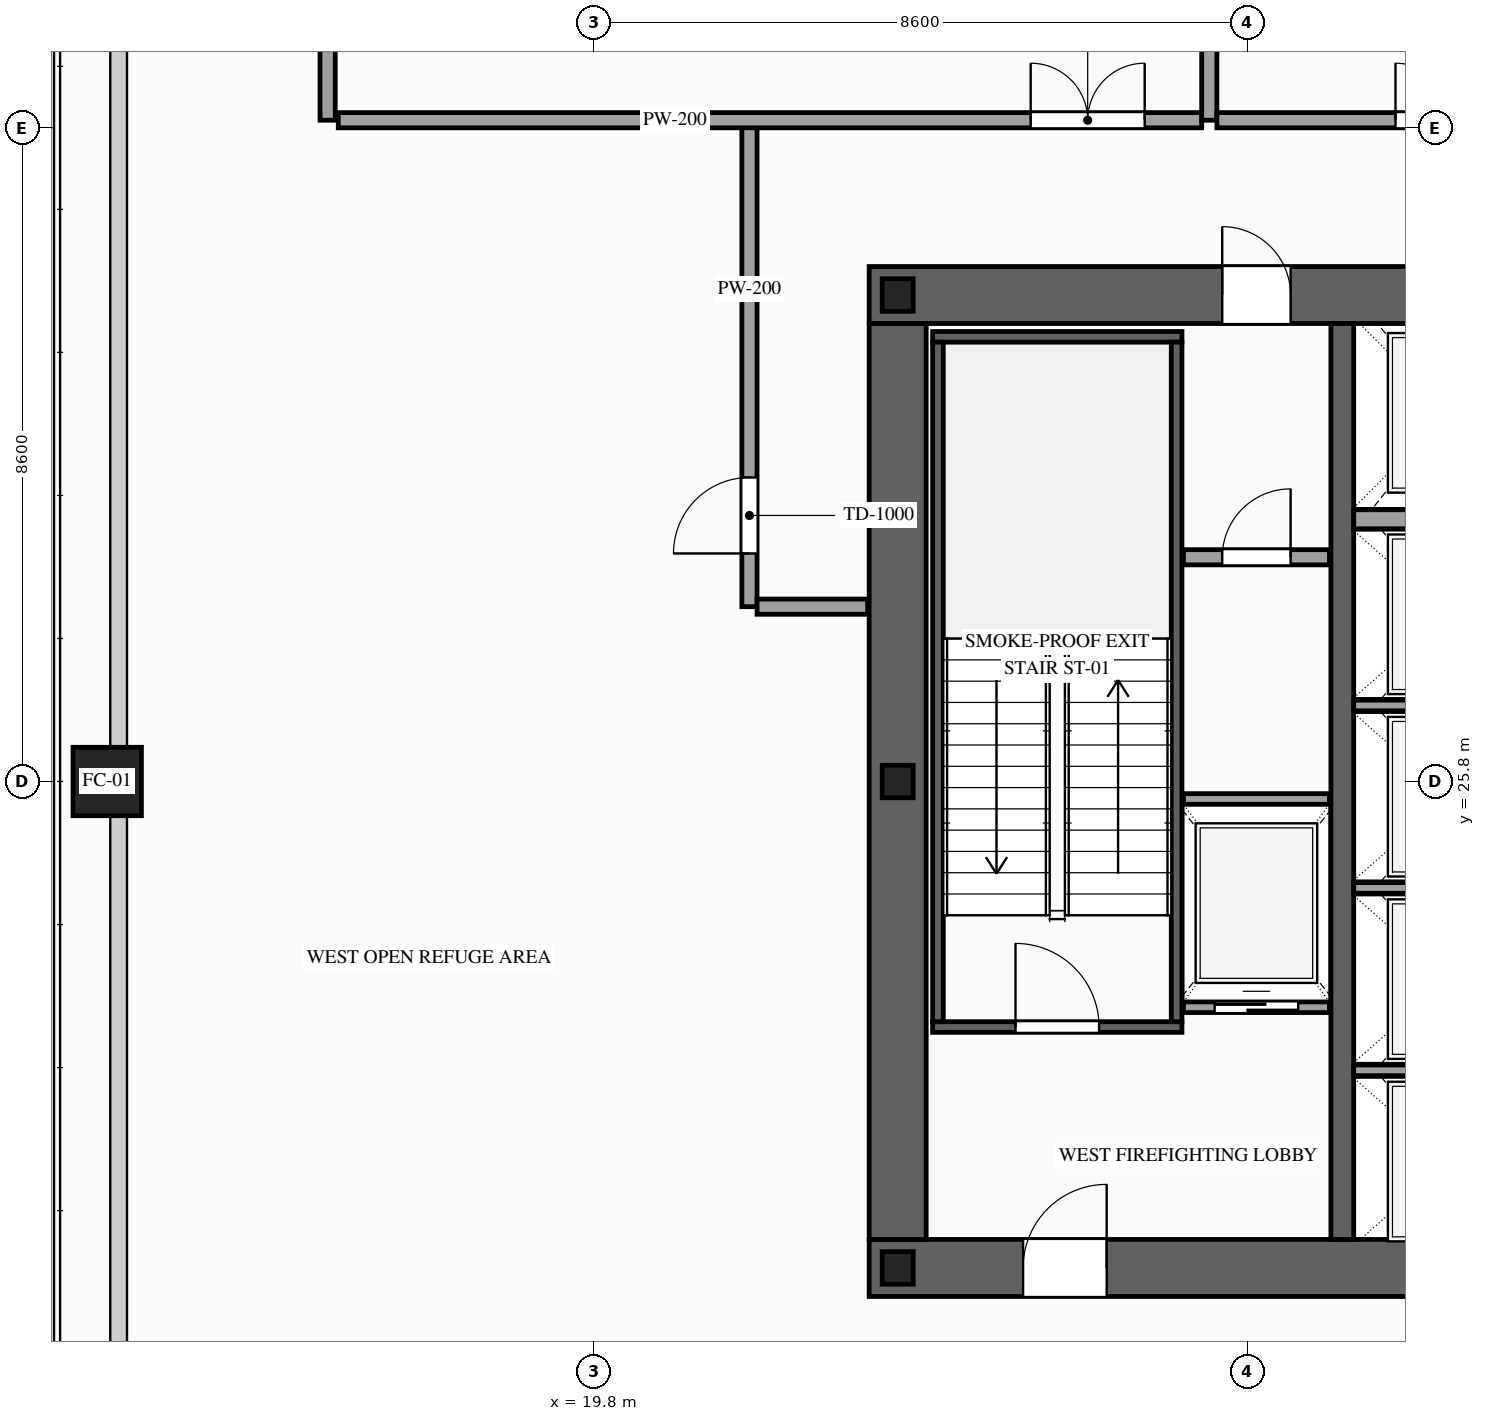
"""IFC4 building model, lengths in metres.
Left out: names, types, materials, properties, quantities, classifications, styles, units other than length and angle.
Written with IfcOpenShell. Run it as: python <this file> out.ifc"""

import sys

from ifc_helpers import new_model, si_unit, direction, frame, frame_2d, origin, origin_2d, place, context, subcontext, project, spatial, rectangle, hollow_rectangle, i_section, extrude, source, transform, mapped, element, fill, save


model = new_model("IFC4")
c1 = context("Model", 3, precision=1e-05, world=origin(), true_north=direction((0.0, 1.0)))
c2 = subcontext(c1, "Body", "Model", "MODEL_VIEW")
j1 = project(units=[si_unit("LENGTHUNIT", "METRE"), si_unit("PLANEANGLEUNIT", "RADIAN")], contexts=[c1])
p1 = place(None, origin())
s1 = spatial("IfcSite", under=j1, at=p1, CompositionType="ELEMENT")
p2 = place(p1, origin())
s2 = spatial("IfcBuilding", under=s1, at=p2, CompositionType="ELEMENT")
p3 = place(p2, frame((0.0, 0.0, 129.8)))
s3 = spatial("IfcBuildingStorey", under=s2, at=p3, CompositionType="ELEMENT", Elevation=129.8)
p4 = place(p3, frame((23.425, 19.4, 0.0), z_axis=(0.0, 0.0, 1.0), x_axis=(1.0, 0.0, 0.0)))
e1 = element("IfcWall", 1, at=p4, inside=s3, PredefinedType="SHEAR", context=c2, shape_type="SweptSolid", body=[
    extrude(rectangle(XDim=27.15, YDim=0.75, at=frame_2d((13.575, 0.0))), origin(), (0.0, 0.0, 1.0), 4.6),
])
p5 = place(p4, frame((2.025, 0.0, 0.0)))
e2 = element("IfcOpeningElement", 2, at=p5, cuts=e1, PredefinedType="OPENING", context=c2, shape_type="SweptSolid", body=[
    extrude(rectangle(XDim=1.1, YDim=2.2, at=frame_2d((0.55, 1.1))), frame((0.0, 0.39, 0.0), z_axis=(0.0, -1.0, 0.0), x_axis=(1.0, 0.0, 0.0)), (0.0, 0.0, 1.0), 0.78),
])
p6 = place(p4, frame((9.925, 0.0, 0.0)))
e3 = element("IfcOpeningElement", 3, at=p6, cuts=e1, PredefinedType="OPENING", context=c2, shape_type="SweptSolid", body=[
    extrude(rectangle(XDim=1.1, YDim=2.2, at=frame_2d((0.55, 1.1))), frame((0.0, 0.39, 0.0), z_axis=(0.0, -1.0, 0.0), x_axis=(1.0, 0.0, 0.0)), (0.0, 0.0, 1.0), 0.78),
])
p7 = place(p4, frame((23.125, 0.0, 0.0)))
e4 = element("IfcOpeningElement", 4, at=p7, cuts=e1, PredefinedType="OPENING", context=c2, shape_type="SweptSolid", body=[
    extrude(rectangle(XDim=1.1, YDim=2.2, at=frame_2d((0.55, 1.1))), frame((0.0, 0.39, 0.0), z_axis=(0.0, -1.0, 0.0), x_axis=(1.0, 0.0, 0.0)), (0.0, 0.0, 1.0), 0.78),
])
p8 = place(p4, frame((19.745, 0.0, 0.0)))
e5 = element("IfcOpeningElement", 5, at=p8, cuts=e1, PredefinedType="OPENING", context=c2, shape_type="SweptSolid", body=[
    extrude(rectangle(XDim=0.9, YDim=2.15, at=frame_2d((0.45, 1.075))), frame((0.0, 0.39, 0.0), z_axis=(0.0, -1.0, 0.0), x_axis=(1.0, 0.0, 0.0)), (0.0, 0.0, 1.0), 0.78),
])
p9 = place(p3, frame((23.425, 32.2, 0.0), z_axis=(0.0, 0.0, 1.0), x_axis=(1.0, 0.0, 0.0)))
e6 = element("IfcWall", 6, at=p9, inside=s3, PredefinedType="SHEAR", context=c2, shape_type="SweptSolid", body=[
    extrude(rectangle(XDim=27.15, YDim=0.75, at=frame_2d((13.575, 0.0))), origin(), (0.0, 0.0, 1.0), 4.6),
])
p10 = place(p9, frame((4.645, 0.0, 0.0)))
e7 = element("IfcOpeningElement", 7, at=p10, cuts=e6, PredefinedType="OPENING", context=c2, shape_type="SweptSolid", body=[
    extrude(rectangle(XDim=0.9, YDim=2.15, at=frame_2d((0.45, 1.075))), frame((0.0, 0.39, 0.0), z_axis=(0.0, -1.0, 0.0), x_axis=(1.0, 0.0, 0.0)), (0.0, 0.0, 1.0), 0.78),
])
p11 = place(p9, frame((9.925, 0.0, 0.0)))
e8 = element("IfcOpeningElement", 8, at=p11, cuts=e6, PredefinedType="OPENING", context=c2, shape_type="SweptSolid", body=[
    extrude(rectangle(XDim=1.1, YDim=2.2, at=frame_2d((0.55, 1.1))), frame((0.0, 0.39, 0.0), z_axis=(0.0, -1.0, 0.0), x_axis=(1.0, 0.0, 0.0)), (0.0, 0.0, 1.0), 0.78),
])
p12 = place(p9, frame((15.775, 0.0, 0.0)))
e9 = element("IfcOpeningElement", 9, at=p12, cuts=e6, PredefinedType="OPENING", context=c2, shape_type="SweptSolid", body=[
    extrude(rectangle(XDim=1.1, YDim=2.2, at=frame_2d((0.55, 1.1))), frame((0.0, 0.39, 0.0), z_axis=(0.0, -1.0, 0.0), x_axis=(1.0, 0.0, 0.0)), (0.0, 0.0, 1.0), 0.78),
])
p13 = place(p9, frame((18.975, 0.0, 0.0)))
e10 = element("IfcOpeningElement", 10, at=p13, cuts=e6, PredefinedType="OPENING", context=c2, shape_type="SweptSolid", body=[
    extrude(rectangle(XDim=0.9, YDim=2.15, at=frame_2d((0.45, 1.075))), frame((0.0, 0.39, 0.0), z_axis=(0.0, -1.0, 0.0), x_axis=(1.0, 0.0, 0.0)), (0.0, 0.0, 1.0), 0.78),
])
m1 = source(origin(), c2, "Body", "SweptSolid", [
    extrude(rectangle(XDim=12.05, YDim=0.75, at=frame_2d((6.025, 0.0))), origin(), (0.0, 0.0, 1.0), 4.6),
])
p14 = place(p3, frame((23.8, 19.775, 0.0), z_axis=(0.0, 0.0, 1.0), x_axis=(0.0, 1.0, 0.0)))
e11 = element("IfcWall", 11, at=p14, inside=s3, PredefinedType="SHEAR", context=c2, shape_type="MappedRepresentation", body=[
    mapped(m1, transform((0.0, 0.0, 0.0), scale=1.0)),
])
m2 = source(origin(), c2, "Body", "SweptSolid", [
    extrude(rectangle(XDim=12.05, YDim=0.3, at=frame_2d((6.025, 0.0))), origin(), (0.0, 0.0, 1.0), 4.6),
])
p15 = place(p3, frame((29.65, 19.775, 0.0), z_axis=(0.0, 0.0, 1.0), x_axis=(0.0, 1.0, 0.0)))
e12 = element("IfcWall", 12, at=p15, inside=s3, PredefinedType="SOLIDWALL", context=c2, shape_type="MappedRepresentation", body=[
    mapped(m2, transform((0.0, 0.0, 0.0), scale=1.0)),
])
m3 = source(origin(), c2, "Body", "SweptSolid", [
    extrude(i_section(OverallWidth=0.407, OverallDepth=0.428, WebThickness=0.02, FlangeThickness=0.035, at=origin_2d()), origin(), (0.0, 0.0, 1.0), 4.6),
])
for number, where, z_axis, x_axis in (
    (13, (23.8, 19.4, 0.0), (0.0, 0.0, 1.0), (1.0, 0.0, 0.0)),
    (14, (23.8, 25.8, 0.0), (0.0, 0.0, 1.0), (1.0, 0.0, 0.0)),
    (15, (23.8, 32.2, 0.0), (0.0, 0.0, 1.0), (1.0, 0.0, 0.0)),
):
    element("IfcColumn", number, at=place(p3, frame(where, z_axis=z_axis, x_axis=x_axis)), inside=s3, PredefinedType="COLUMN", context=c2, shape_type="MappedRepresentation", body=[
        mapped(m3, transform((0.0, 0.0, 0.0), scale=1.0)),
    ])
m4 = source(origin(), c2, "Body", "SweptSolid", [
    extrude(hollow_rectangle(XDim=0.9, YDim=0.9, WallThickness=0.042, at=origin_2d()), origin(), (0.0, 0.0, 1.0), 4.6),
])
p16 = place(p3, frame((13.4, 25.8, 0.0), z_axis=(0.0, 0.0, 1.0), x_axis=(1.0, 0.0, 0.0)))
e16 = element("IfcColumn", 16, at=p16, inside=s3, PredefinedType="COLUMN", context=c2, shape_type="MappedRepresentation", body=[
    mapped(m4, transform((0.0, 0.0, 0.0), scale=1.0)),
])
p17 = place(p3, frame((27.56, 22.83, 0.0), z_axis=(0.0, 0.0, 1.0), x_axis=(1.0, 0.0, 0.0)))
e17 = element("IfcWall", 17, at=p17, inside=s3, PredefinedType="SOLIDWALL", context=c2, shape_type="SweptSolid", body=[
    extrude(rectangle(XDim=1.92, YDim=0.14, at=frame_2d((0.96, 0.0))), origin(), (0.0, 0.0, 1.0), 4.38),
])
p18 = place(p17, frame((0.41, 0.0, 0.0)))
e18 = element("IfcOpeningElement", 18, at=p18, cuts=e17, PredefinedType="OPENING", context=c2, shape_type="SweptSolid", body=[
    extrude(rectangle(XDim=1.1, YDim=2.2, at=frame_2d((0.55, 1.1))), frame((0.0, 0.085, 0.0), z_axis=(0.0, -1.0, 0.0), x_axis=(1.0, 0.0, 0.0)), (0.0, 0.0, 1.0), 0.17),
])
m5 = source(origin(), c2, "Body", "SweptSolid", [
    extrude(rectangle(XDim=1.92, YDim=0.14, at=frame_2d((0.96, 0.0))), origin(), (0.0, 0.0, 1.0), 4.38),
])
p19 = place(p3, frame((27.56, 25.57, 0.0), z_axis=(0.0, 0.0, 1.0), x_axis=(1.0, 0.0, 0.0)))
e19 = element("IfcWall", 19, at=p19, inside=s3, PredefinedType="SOLIDWALL", context=c2, shape_type="MappedRepresentation", body=[
    mapped(m5, transform((0.0, 0.0, 0.0), scale=1.0)),
])
m6 = source(origin(), c2, "Body", "SweptSolid", [
    extrude(rectangle(XDim=2.5, YDim=0.14, at=frame_2d((1.25, 0.0))), origin(), (0.0, 0.0, 1.0), 4.38),
])
for number, where, z_axis, x_axis in (
    (20, (29.8, 22.0, 0.0), (0.0, 0.0, 1.0), (1.0, 0.0, 0.0)),
    (21, (29.8, 24.4, 0.0), (0.0, 0.0, 1.0), (1.0, 0.0, 0.0)),
    (22, (29.8, 26.8, 0.0), (0.0, 0.0, 1.0), (1.0, 0.0, 0.0)),
):
    element("IfcWall", number, at=place(p3, frame(where, z_axis=z_axis, x_axis=x_axis)), inside=s3, PredefinedType="SOLIDWALL", context=c2, shape_type="MappedRepresentation", body=[
        mapped(m6, transform((0.0, 0.0, 0.0), scale=1.0)),
    ])
m7 = source(origin(), c2, "Body", "SweptSolid", [
    extrude(rectangle(XDim=2.5, YDim=0.25, at=frame_2d((1.25, 0.0))), origin(), (0.0, 0.0, 1.0), 4.38),
])
p20 = place(p3, frame((29.8, 29.25, 0.0), z_axis=(0.0, 0.0, 1.0), x_axis=(1.0, 0.0, 0.0)))
e23 = element("IfcWall", 23, at=p20, inside=s3, PredefinedType="SOLIDWALL", context=c2, shape_type="MappedRepresentation", body=[
    mapped(m7, transform((0.0, 0.0, 0.0), scale=1.0)),
])
p21 = place(p3, frame((24.26, 22.57, 0.0), z_axis=(0.0, 0.0, 1.0), x_axis=(1.0, 0.0, 0.0)))
e24 = element("IfcWall", 24, at=p21, inside=s3, PredefinedType="SOLIDWALL", context=c2, shape_type="SweptSolid", body=[
    extrude(rectangle(XDim=3.28, YDim=0.14, at=frame_2d((1.64, 0.0))), origin(), (0.0, 0.0, 1.0), 4.38),
])
p22 = place(p21, frame((1.09, 0.0, 0.0)))
e25 = element("IfcOpeningElement", 25, at=p22, cuts=e24, PredefinedType="OPENING", context=c2, shape_type="SweptSolid", body=[
    extrude(rectangle(XDim=1.1, YDim=2.2, at=frame_2d((0.55, 1.1))), frame((0.0, 0.085, 0.0), z_axis=(0.0, -1.0, 0.0), x_axis=(1.0, 0.0, 0.0)), (0.0, 0.0, 1.0), 0.17),
])
m8 = source(origin(), c2, "Body", "SweptSolid", [
    extrude(rectangle(XDim=3.28, YDim=0.14, at=frame_2d((1.64, 0.0))), origin(), (0.0, 0.0, 1.0), 4.38),
])
p23 = place(p3, frame((24.26, 31.65, 0.0), z_axis=(0.0, 0.0, 1.0), x_axis=(1.0, 0.0, 0.0)))
e26 = element("IfcWall", 26, at=p23, inside=s3, PredefinedType="SOLIDWALL", context=c2, shape_type="MappedRepresentation", body=[
    mapped(m8, transform((0.0, 0.0, 0.0), scale=1.0)),
])
m9 = source(origin(), c2, "Body", "SweptSolid", [
    extrude(rectangle(XDim=8.94, YDim=0.14, at=frame_2d((4.47, 0.0))), origin(), (0.0, 0.0, 1.0), 4.38),
])
for number, where, z_axis, x_axis in (
    (27, (24.33, 22.64, 0.0), (0.0, 0.0, 1.0), (0.0, 1.0, 0.0)),
    (28, (27.47, 22.64, 0.0), (0.0, 0.0, 1.0), (0.0, 1.0, 0.0)),
):
    element("IfcWall", number, at=place(p3, frame(where, z_axis=z_axis, x_axis=x_axis)), inside=s3, PredefinedType="SOLIDWALL", context=c2, shape_type="MappedRepresentation", body=[
        mapped(m9, transform((0.0, 0.0, 0.0), scale=1.0)),
    ])
p24 = place(p3, frame((27.56, 28.75, 0.0), z_axis=(0.0, 0.0, 1.0), x_axis=(1.0, 0.0, 0.0)))
e29 = element("IfcWall", 29, at=p24, inside=s3, PredefinedType="PARTITIONING", context=c2, shape_type="SweptSolid", body=[
    extrude(rectangle(XDim=1.92, YDim=0.2, at=frame_2d((0.96, 0.0))), origin(), (0.0, 0.0, 1.0), 4.38),
])
p25 = place(p24, frame((0.51, 0.0, 0.0)))
e30 = element("IfcOpeningElement", 30, at=p25, cuts=e29, PredefinedType="OPENING", context=c2, shape_type="SweptSolid", body=[
    extrude(rectangle(XDim=0.9, YDim=2.15, at=frame_2d((0.45, 1.075))), frame((0.0, 0.115, 0.0), z_axis=(0.0, -1.0, 0.0), x_axis=(1.0, 0.0, 0.0)), (0.0, 0.0, 1.0), 0.23),
])
m10 = source(origin(), c2, "Body", "SweptSolid", [
    extrude(rectangle(XDim=14.6, YDim=0.2, at=frame_2d((7.3, 0.0))), origin(), (0.0, 0.0, 1.0), 4.38),
])
p26 = place(p3, frame((16.3, 34.5, 0.0), z_axis=(0.0, 0.0, 1.0), x_axis=(0.0, 1.0, 0.0)))
e31 = element("IfcWall", 31, at=p26, inside=s3, PredefinedType="PARTITIONING", context=c2, shape_type="MappedRepresentation", body=[
    mapped(m10, transform((0.0, 0.0, 0.0), scale=1.0)),
])
p27 = place(p3, frame((21.85, 28.1, 0.0), z_axis=(0.0, 0.0, 1.0), x_axis=(0.0, 1.0, 0.0)))
e32 = element("IfcWall", 32, at=p27, inside=s3, PredefinedType="PARTITIONING", context=c2, shape_type="SweptSolid", body=[
    extrude(rectangle(XDim=6.4, YDim=0.2, at=frame_2d((3.2, 0.0))), origin(), (0.0, 0.0, 1.0), 4.38),
])
p28 = place(p27, frame((0.7, 0.0, 0.0)))
e33 = element("IfcOpeningElement", 33, at=p28, cuts=e32, PredefinedType="OPENING", context=c2, shape_type="SweptSolid", body=[
    extrude(rectangle(XDim=1.0, YDim=2.2, at=frame_2d((0.5, 1.1))), frame((0.0, 0.115, 0.0), z_axis=(0.0, -1.0, 0.0), x_axis=(1.0, 0.0, 0.0)), (0.0, 0.0, 1.0), 0.23),
])
m11 = source(origin(), c2, "Body", "SweptSolid", [
    extrude(rectangle(XDim=1.455, YDim=0.2, at=frame_2d((0.728, 0.0))), origin(), (0.0, 0.0, 1.0), 4.38),
])
p29 = place(p3, frame((21.95, 28.1, 0.0), z_axis=(0.0, 0.0, 1.0), x_axis=(1.0, 0.0, 0.0)))
e34 = element("IfcWall", 34, at=p29, inside=s3, PredefinedType="PARTITIONING", context=c2, shape_type="MappedRepresentation", body=[
    mapped(m11, transform((0.0, 0.0, 0.0), scale=1.0)),
])
p30 = place(p3, frame((16.44, 34.5, 0.0), z_axis=(0.0, 0.0, 1.0), x_axis=(1.0, 0.0, 0.0)))
e35 = element("IfcWall", 35, at=p30, inside=s3, PredefinedType="PARTITIONING", context=c2, shape_type="SweptSolid", body=[
    extrude(rectangle(XDim=11.36, YDim=0.2, at=frame_2d((5.68, 0.0))), origin(), (0.0, 0.0, 1.0), 4.38),
])
p31 = place(p30, frame((9.11, 0.0, 0.0)))
e36 = element("IfcOpeningElement", 36, at=p31, cuts=e35, PredefinedType="OPENING", context=c2, shape_type="SweptSolid", body=[
    extrude(rectangle(XDim=1.5, YDim=2.3, at=frame_2d((0.75, 1.15))), frame((0.0, 0.115, 0.0), z_axis=(0.0, -1.0, 0.0), x_axis=(1.0, 0.0, 0.0)), (0.0, 0.0, 1.0), 0.23),
])
p32 = place(p3, frame((27.9, 34.5, 0.0), z_axis=(0.0, 0.0, 1.0), x_axis=(0.0, 1.0, 0.0)))
e37 = element("IfcWall", 37, at=p32, inside=s3, PredefinedType="PARTITIONING", context=c2, shape_type="MappedRepresentation", body=[
    mapped(m10, transform((0.0, 0.0, 0.0), scale=1.0)),
])
p33 = place(p3, frame((28.0, 34.5, 0.0), z_axis=(0.0, 0.0, 1.0), x_axis=(1.0, 0.0, 0.0)))
e38 = element("IfcWall", 38, at=p33, inside=s3, PredefinedType="PARTITIONING", context=c2, shape_type="SweptSolid", body=[
    extrude(rectangle(XDim=6.2, YDim=0.2, at=frame_2d((3.1, 0.0))), origin(), (0.0, 0.0, 1.0), 4.38),
])
p34 = place(p33, frame((2.35, 0.0, 0.0)))
e39 = element("IfcOpeningElement", 39, at=p34, cuts=e38, PredefinedType="OPENING", context=c2, shape_type="SweptSolid", body=[
    extrude(rectangle(XDim=1.5, YDim=2.3, at=frame_2d((0.75, 1.15))), frame((0.0, 0.115, 0.0), z_axis=(0.0, -1.0, 0.0), x_axis=(1.0, 0.0, 0.0)), (0.0, 0.0, 1.0), 0.23),
])
m12 = source(origin(), c2, "Body", "SweptSolid", [
    extrude(rectangle(XDim=1.1, YDim=2.2, at=frame_2d((0.55, 1.1))), frame((0.0, 0.025, 0.0), z_axis=(0.0, -1.0, 0.0), x_axis=(1.0, 0.0, 0.0)), (0.0, 0.0, 1.0), 0.05),
])
p35 = place(p18, origin())
e40 = element("IfcDoor", 40, at=p35, inside=s3, OperationType="SLIDING_TO_LEFT", PredefinedType="DOOR", context=c2, shape_type="MappedRepresentation", body=[
    mapped(m12, transform((0.0, 0.0, 0.0), scale=1.0)),
])
fill(e18, e40)
m13 = source(origin(), c2, "Body", "SweptSolid", [
    extrude(rectangle(XDim=1.1, YDim=2.2, at=frame_2d((0.55, 1.1))), frame((0.0, 0.025, 0.0), z_axis=(0.0, -1.0, 0.0), x_axis=(1.0, 0.0, 0.0)), (0.0, 0.0, 1.0), 0.05),
])
p36 = place(p22, origin())
e41 = element("IfcDoor", 41, at=p36, inside=s3, OperationType="SINGLE_SWING_LEFT", PredefinedType="DOOR", context=c2, shape_type="MappedRepresentation", body=[
    mapped(m13, transform((0.0, 0.0, 0.0), scale=1.0)),
])
fill(e25, e41)
p37 = place(p5, origin())
e42 = element("IfcDoor", 42, at=p37, inside=s3, OperationType="SINGLE_SWING_RIGHT", PredefinedType="DOOR", context=c2, shape_type="MappedRepresentation", body=[
    mapped(m13, transform((0.0, 0.0, 0.0), scale=1.0)),
])
fill(e2, e42)
m14 = source(origin(), c2, "Body", "SweptSolid", [
    extrude(rectangle(XDim=0.9, YDim=2.15, at=frame_2d((0.45, 1.075))), frame((0.0, 0.025, 0.0), z_axis=(0.0, -1.0, 0.0), x_axis=(1.0, 0.0, 0.0)), (0.0, 0.0, 1.0), 0.05),
])
p38 = place(p10, origin())
e43 = element("IfcDoor", 43, at=p38, inside=s3, OperationType="SINGLE_SWING_LEFT", PredefinedType="DOOR", context=c2, shape_type="MappedRepresentation", body=[
    mapped(m14, transform((0.0, 0.0, 0.0), scale=1.0)),
])
fill(e7, e43)
p39 = place(p25, origin())
e44 = element("IfcDoor", 44, at=p39, inside=s3, OperationType="SINGLE_SWING_RIGHT", PredefinedType="DOOR", context=c2, shape_type="MappedRepresentation", body=[
    mapped(m14, transform((0.0, 0.0, 0.0), scale=1.0)),
])
fill(e30, e44)
m15 = source(origin(), c2, "Body", "SweptSolid", [
    extrude(rectangle(XDim=1.0, YDim=2.2, at=frame_2d((0.5, 1.1))), frame((0.0, 0.025, 0.0), z_axis=(0.0, -1.0, 0.0), x_axis=(1.0, 0.0, 0.0)), (0.0, 0.0, 1.0), 0.05),
])
p40 = place(p28, origin())
e45 = element("IfcDoor", 45, at=p40, inside=s3, OperationType="SINGLE_SWING_LEFT", PredefinedType="DOOR", context=c2, shape_type="MappedRepresentation", body=[
    mapped(m15, transform((0.0, 0.0, 0.0), scale=1.0)),
])
fill(e33, e45)
m16 = source(origin(), c2, "Body", "SweptSolid", [
    extrude(rectangle(XDim=1.5, YDim=2.3, at=frame_2d((0.75, 1.15))), frame((0.0, 0.025, 0.0), z_axis=(0.0, -1.0, 0.0), x_axis=(1.0, 0.0, 0.0)), (0.0, 0.0, 1.0), 0.05),
])
p41 = place(p31, origin())
e46 = element("IfcDoor", 46, at=p41, inside=s3, OperationType="DOUBLE_DOOR_SINGLE_SWING", PredefinedType="DOOR", context=c2, shape_type="MappedRepresentation", body=[
    mapped(m16, transform((0.0, 0.0, 0.0), scale=1.0)),
])
fill(e36, e46)
p42 = place(p34, origin())
e47 = element("IfcDoor", 47, at=p42, inside=s3, OperationType="DOUBLE_DOOR_SINGLE_SWING", PredefinedType="DOOR", context=c2, shape_type="MappedRepresentation", body=[
    mapped(m16, transform((0.0, 0.0, 0.0), scale=1.0)),
])
fill(e39, e47)
save(model, sys.argv[1])
